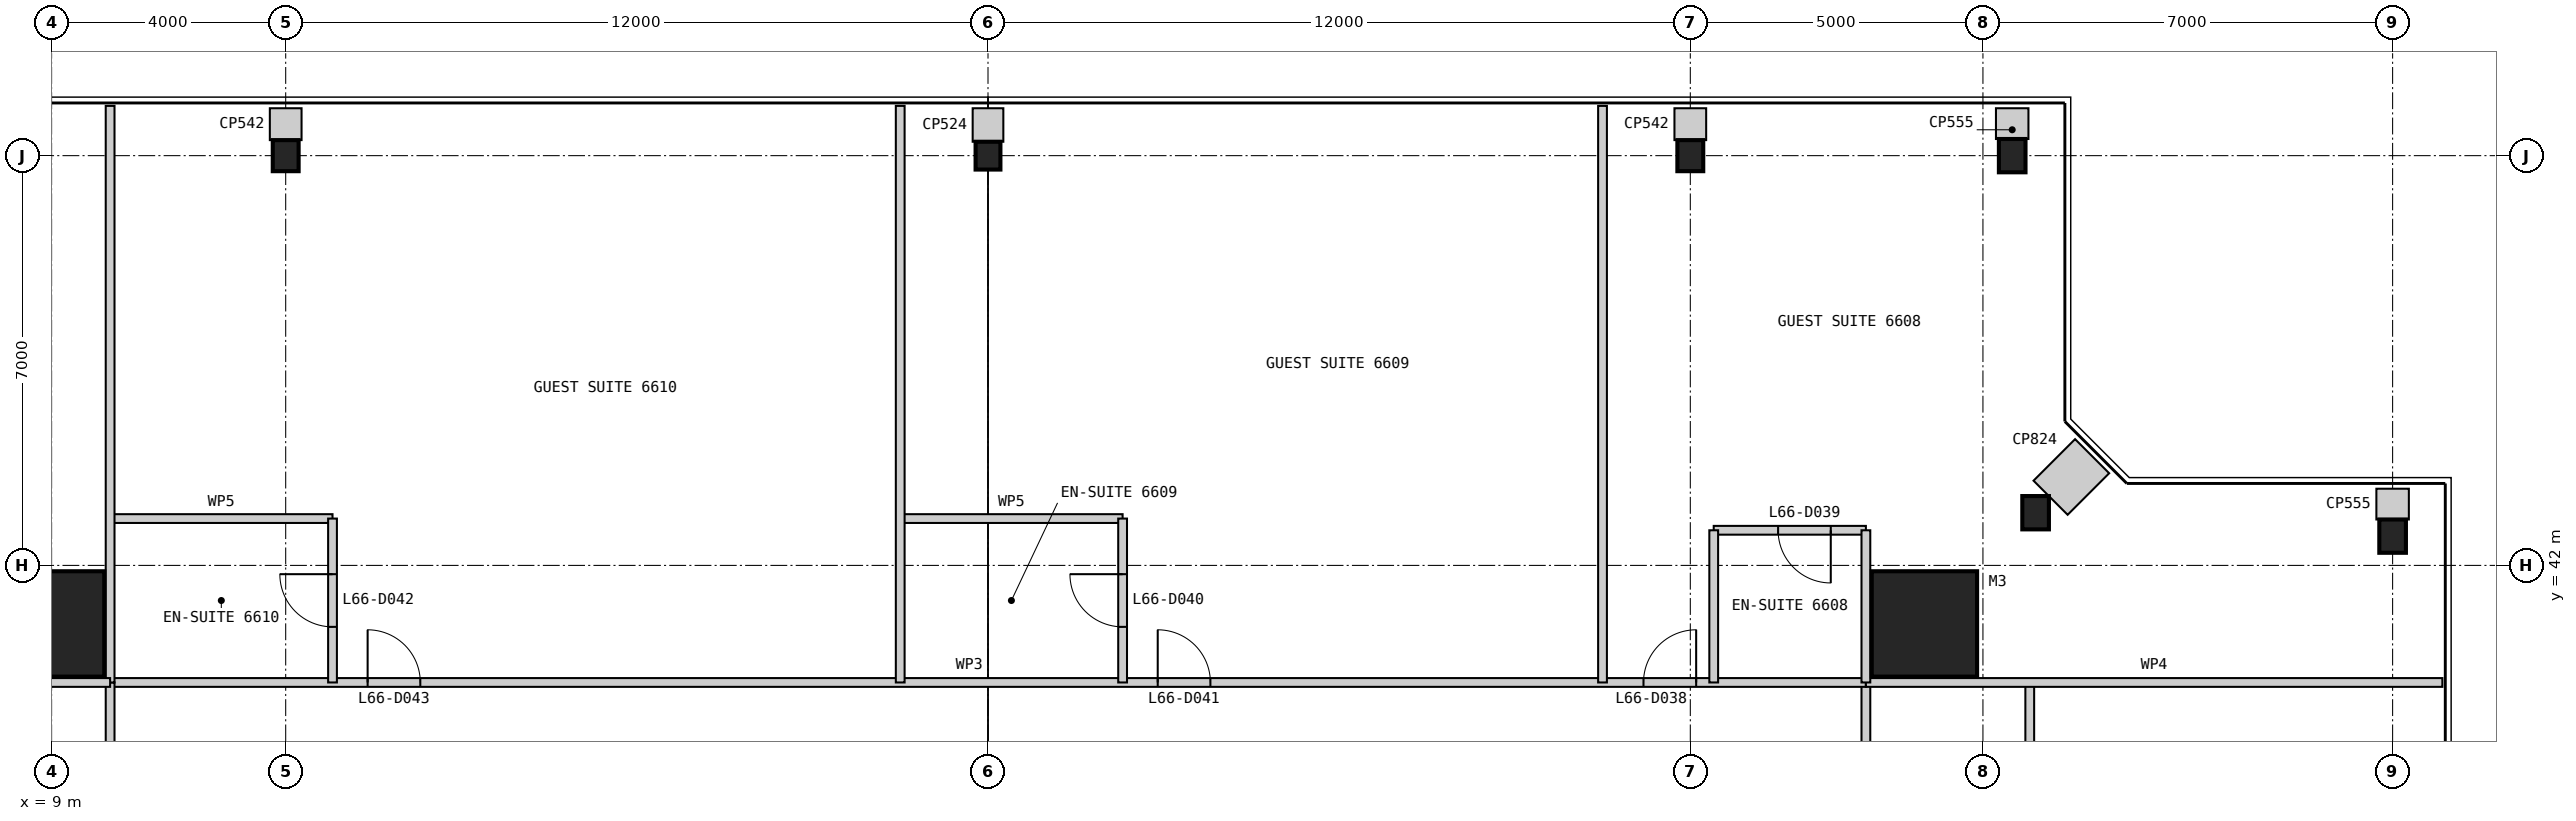
"""IFC4 building model, lengths in metres.
Left out: names, types, materials, properties, quantities, classifications, styles, units other than length and angle.
Written with IfcOpenShell. Run it as: python <this file> out.ifc"""

import sys

from ifc_helpers import new_model, si_unit, direction, frame, frame_2d, origin, origin_2d, place, context, subcontext, project, spatial, rectangle, i_section, extrude, element, fill, save


model = new_model("IFC4")
c1 = context("Model", 3, precision=1e-05, world=origin(), true_north=direction((0.0, 1.0)))
c2 = subcontext(c1, "Body", "Model", "MODEL_VIEW")
j1 = project(units=[si_unit("LENGTHUNIT", "METRE"), si_unit("PLANEANGLEUNIT", "RADIAN")], contexts=[c1])
p1 = place(None, origin())
s1 = spatial("IfcSite", under=j1, at=p1, CompositionType="ELEMENT")
p2 = place(p1, origin())
s2 = spatial("IfcBuilding", under=s1, at=p2, CompositionType="ELEMENT")
p3 = place(p2, frame((0.0, 0.0, 276.4)))
s3 = spatial("IfcBuildingStorey", under=s2, at=p3, CompositionType="ELEMENT", Elevation=276.4)
for number, where, z_axis, x_axis in (
    (1, (41.0, 41.0, 0.0), (0.0, 0.0, 1.0), (1.0, 0.0, 0.0)),
    (2, (9.0, 41.0, 0.0), (0.0, 0.0, 1.0), (1.0, 0.0, 0.0)),
):
    element("IfcColumn", number, at=place(p3, frame(where, z_axis=z_axis, x_axis=x_axis)), inside=s3, PredefinedType="COLUMN", context=c2, shape_type="SweptSolid", body=[
        extrude(rectangle(XDim=1.8, YDim=1.8, at=origin_2d()), origin(), (0.0, 0.0, 1.0), 3.4),
    ])
for number, where, z_axis, x_axis in (
    (3, (49.0, 42.5, 0.0), (0.0, 0.0, 1.0), (1.0, 0.0, 0.0)),
    (4, (42.9, 42.9, 0.0), (0.0, 0.0, 1.0), (1.0, 0.0, 0.0)),
    (5, (42.5, 49.0, 0.0), (0.0, 0.0, 1.0), (1.0, 0.0, 0.0)),
):
    element("IfcColumn", number, at=place(p3, frame(where, z_axis=z_axis, x_axis=x_axis)), inside=s3, PredefinedType="COLUMN", context=c2, shape_type="SweptSolid", body=[
        extrude(i_section(OverallWidth=0.455, OverallDepth=0.569, WebThickness=0.078, FlangeThickness=0.125, at=origin_2d()), origin(), (0.0, 0.0, 1.0), 3.4),
    ])
p4 = place(p3, frame((37.0, 49.0, 0.0), z_axis=(0.0, 0.0, 1.0), x_axis=(1.0, 0.0, 0.0)))
e6 = element("IfcColumn", 6, at=p4, inside=s3, PredefinedType="COLUMN", context=c2, shape_type="SweptSolid", body=[
    extrude(i_section(OverallWidth=0.442, OverallDepth=0.531, WebThickness=0.066, FlangeThickness=0.106, at=origin_2d()), origin(), (0.0, 0.0, 1.0), 3.4),
])
p5 = place(p3, frame((25.0, 49.0, 0.0), z_axis=(0.0, 0.0, 1.0), x_axis=(1.0, 0.0, 0.0)))
e7 = element("IfcColumn", 7, at=p5, inside=s3, PredefinedType="COLUMN", context=c2, shape_type="SweptSolid", body=[
    extrude(i_section(OverallWidth=0.424, OverallDepth=0.475, WebThickness=0.048, FlangeThickness=0.077, at=origin_2d()), origin(), (0.0, 0.0, 1.0), 3.4),
])
p6 = place(p3, frame((13.0, 49.0, 0.0), z_axis=(0.0, 0.0, 1.0), x_axis=(1.0, 0.0, 0.0)))
e8 = element("IfcColumn", 8, at=p6, inside=s3, PredefinedType="COLUMN", context=c2, shape_type="SweptSolid", body=[
    extrude(i_section(OverallWidth=0.442, OverallDepth=0.531, WebThickness=0.066, FlangeThickness=0.106, at=origin_2d()), origin(), (0.0, 0.0, 1.0), 3.4),
])
p7 = place(p3, frame((40.0, 10.0, 0.0), z_axis=(0.0, 0.0, 1.0), x_axis=(0.0, 1.0, 0.0)))
e9 = element("IfcWall", 9, at=p7, inside=s3, PredefinedType="PARTITIONING", context=c2, shape_type="SweptSolid", body=[
    extrude(rectangle(XDim=30.0, YDim=0.15, at=frame_2d((15.0, 0.0))), origin(), (0.0, 0.0, 1.0), 2.638),
])
p8 = place(p7, frame((2.9, 0.0, 0.0)))
e10 = element("IfcOpeningElement", 10, at=p8, cuts=e9, PredefinedType="OPENING", context=c2, shape_type="SweptSolid", body=[
    extrude(rectangle(XDim=0.9, YDim=2.1, at=frame_2d((0.45, 1.05))), frame((0.0, 0.085, 0.0), z_axis=(0.0, -1.0, 0.0), x_axis=(1.0, 0.0, 0.0)), (0.0, 0.0, 1.0), 0.17),
])
p9 = place(p7, frame((11.2, 0.0, 0.0)))
e11 = element("IfcOpeningElement", 11, at=p9, cuts=e9, PredefinedType="OPENING", context=c2, shape_type="SweptSolid", body=[
    extrude(rectangle(XDim=0.9, YDim=2.1, at=frame_2d((0.45, 1.05))), frame((0.0, 0.085, 0.0), z_axis=(0.0, -1.0, 0.0), x_axis=(1.0, 0.0, 0.0)), (0.0, 0.0, 1.0), 0.17),
])
p10 = place(p7, frame((24.7, 0.0, 0.0)))
e12 = element("IfcOpeningElement", 12, at=p10, cuts=e9, PredefinedType="OPENING", context=c2, shape_type="SweptSolid", body=[
    extrude(rectangle(XDim=0.9, YDim=2.1, at=frame_2d((0.45, 1.05))), frame((0.0, 0.085, 0.0), z_axis=(0.0, -1.0, 0.0), x_axis=(1.0, 0.0, 0.0)), (0.0, 0.0, 1.0), 0.17),
])
p11 = place(p3, frame((42.8, 36.2, 0.0), z_axis=(0.0, 0.0, 1.0), x_axis=(0.0, 1.0, 0.0)))
e13 = element("IfcWall", 13, at=p11, inside=s3, PredefinedType="PARTITIONING", context=c2, shape_type="SweptSolid", body=[
    extrude(rectangle(XDim=3.8, YDim=0.15, at=frame_2d((1.9, 0.0))), origin(), (0.0, 0.0, 1.0), 3.25),
])
p12 = place(p3, frame((40.0, 40.0, 0.0), z_axis=(0.0, 0.0, 1.0), x_axis=(-1.0, 0.0, 0.0)))
e14 = element("IfcWall", 14, at=p12, inside=s3, PredefinedType="PARTITIONING", context=c2, shape_type="SweptSolid", body=[
    extrude(rectangle(XDim=30.0, YDim=0.15, at=frame_2d((15.0, 0.0))), origin(), (0.0, 0.0, 1.0), 3.25),
])
p13 = place(p12, frame((2.9, 0.0, 0.0)))
e15 = element("IfcOpeningElement", 15, at=p13, cuts=e14, PredefinedType="OPENING", context=c2, shape_type="SweptSolid", body=[
    extrude(rectangle(XDim=0.9, YDim=2.1, at=frame_2d((0.45, 1.05))), frame((0.0, 0.085, 0.0), z_axis=(0.0, -1.0, 0.0), x_axis=(1.0, 0.0, 0.0)), (0.0, 0.0, 1.0), 0.17),
])
p14 = place(p12, frame((11.2, 0.0, 0.0)))
e16 = element("IfcOpeningElement", 16, at=p14, cuts=e14, PredefinedType="OPENING", context=c2, shape_type="SweptSolid", body=[
    extrude(rectangle(XDim=0.9, YDim=2.1, at=frame_2d((0.45, 1.05))), frame((0.0, 0.085, 0.0), z_axis=(0.0, -1.0, 0.0), x_axis=(1.0, 0.0, 0.0)), (0.0, 0.0, 1.0), 0.17),
])
p15 = place(p12, frame((24.7, 0.0, 0.0)))
e17 = element("IfcOpeningElement", 17, at=p15, cuts=e14, PredefinedType="OPENING", context=c2, shape_type="SweptSolid", body=[
    extrude(rectangle(XDim=0.9, YDim=2.1, at=frame_2d((0.45, 1.05))), frame((0.0, 0.085, 0.0), z_axis=(0.0, -1.0, 0.0), x_axis=(1.0, 0.0, 0.0)), (0.0, 0.0, 1.0), 0.17),
])
p16 = place(p3, frame((49.85, 40.0, 0.0), z_axis=(0.0, 0.0, 1.0), x_axis=(-1.0, 0.0, 0.0)))
e18 = element("IfcWall", 18, at=p16, inside=s3, PredefinedType="PARTITIONING", context=c2, shape_type="SweptSolid", body=[
    extrude(rectangle(XDim=9.85, YDim=0.15, at=frame_2d((4.925, 0.0))), origin(), (0.0, 0.0, 1.0), 3.25),
])
p17 = place(p3, frame((40.0, 42.6, 0.0), z_axis=(0.0, 0.0, 1.0), x_axis=(-1.0, 0.0, 0.0)))
e19 = element("IfcWall", 19, at=p17, inside=s3, PredefinedType="PARTITIONING", context=c2, shape_type="SweptSolid", body=[
    extrude(rectangle(XDim=2.6, YDim=0.15, at=frame_2d((1.3, 0.0))), origin(), (0.0, 0.0, 1.0), 3.25),
])
p18 = place(p17, frame((0.6, 0.0, 0.0)))
e20 = element("IfcOpeningElement", 20, at=p18, cuts=e19, PredefinedType="OPENING", context=c2, shape_type="SweptSolid", body=[
    extrude(rectangle(XDim=0.9, YDim=2.1, at=frame_2d((0.45, 1.05))), frame((0.0, 0.085, 0.0), z_axis=(0.0, -1.0, 0.0), x_axis=(1.0, 0.0, 0.0)), (0.0, 0.0, 1.0), 0.17),
])
for number, where, z_axis, x_axis in (
    (21, (40.0, 42.6, 0.0), (0.0, 0.0, 1.0), (0.0, -1.0, 0.0)),
    (22, (37.4, 42.6, 0.0), (0.0, 0.0, 1.0), (0.0, -1.0, 0.0)),
):
    element("IfcWall", number, at=place(p3, frame(where, z_axis=z_axis, x_axis=x_axis)), inside=s3, PredefinedType="PARTITIONING", context=c2, shape_type="SweptSolid", body=[
        extrude(rectangle(XDim=2.6, YDim=0.15, at=frame_2d((1.3, 0.0))), origin(), (0.0, 0.0, 1.0), 3.25),
    ])
p19 = place(p3, frame((35.5, 49.85, 0.0), z_axis=(0.0, 0.0, 1.0), x_axis=(0.0, -1.0, 0.0)))
e23 = element("IfcWall", 23, at=p19, inside=s3, PredefinedType="PARTITIONING", context=c2, shape_type="SweptSolid", body=[
    extrude(rectangle(XDim=9.85, YDim=0.15, at=frame_2d((4.925, 0.0))), origin(), (0.0, 0.0, 1.0), 3.25),
])
p20 = place(p3, frame((27.3, 42.8, 0.0), z_axis=(0.0, 0.0, 1.0), x_axis=(-1.0, 0.0, 0.0)))
e24 = element("IfcWall", 24, at=p20, inside=s3, PredefinedType="PARTITIONING", context=c2, shape_type="SweptSolid", body=[
    extrude(rectangle(XDim=3.8, YDim=0.15, at=frame_2d((1.9, 0.0))), origin(), (0.0, 0.0, 1.0), 3.25),
])
p21 = place(p3, frame((27.3, 42.8, 0.0), z_axis=(0.0, 0.0, 1.0), x_axis=(0.0, -1.0, 0.0)))
e25 = element("IfcWall", 25, at=p21, inside=s3, PredefinedType="PARTITIONING", context=c2, shape_type="SweptSolid", body=[
    extrude(rectangle(XDim=2.8, YDim=0.15, at=frame_2d((1.4, 0.0))), origin(), (0.0, 0.0, 1.0), 3.25),
])
p22 = place(p21, frame((0.95, 0.0, 0.0)))
e26 = element("IfcOpeningElement", 26, at=p22, cuts=e25, PredefinedType="OPENING", context=c2, shape_type="SweptSolid", body=[
    extrude(rectangle(XDim=0.9, YDim=2.1, at=frame_2d((0.45, 1.05))), frame((0.0, 0.085, 0.0), z_axis=(0.0, -1.0, 0.0), x_axis=(1.0, 0.0, 0.0)), (0.0, 0.0, 1.0), 0.17),
])
p23 = place(p3, frame((23.5, 49.85, 0.0), z_axis=(0.0, 0.0, 1.0), x_axis=(0.0, -1.0, 0.0)))
e27 = element("IfcWall", 27, at=p23, inside=s3, PredefinedType="PARTITIONING", context=c2, shape_type="SweptSolid", body=[
    extrude(rectangle(XDim=9.85, YDim=0.15, at=frame_2d((4.925, 0.0))), origin(), (0.0, 0.0, 1.0), 3.25),
])
p24 = place(p3, frame((13.8, 42.8, 0.0), z_axis=(0.0, 0.0, 1.0), x_axis=(-1.0, 0.0, 0.0)))
e28 = element("IfcWall", 28, at=p24, inside=s3, PredefinedType="PARTITIONING", context=c2, shape_type="SweptSolid", body=[
    extrude(rectangle(XDim=3.8, YDim=0.15, at=frame_2d((1.9, 0.0))), origin(), (0.0, 0.0, 1.0), 3.25),
])
p25 = place(p3, frame((13.8, 42.8, 0.0), z_axis=(0.0, 0.0, 1.0), x_axis=(0.0, -1.0, 0.0)))
e29 = element("IfcWall", 29, at=p25, inside=s3, PredefinedType="PARTITIONING", context=c2, shape_type="SweptSolid", body=[
    extrude(rectangle(XDim=2.8, YDim=0.15, at=frame_2d((1.4, 0.0))), origin(), (0.0, 0.0, 1.0), 3.25),
])
p26 = place(p25, frame((0.95, 0.0, 0.0)))
e30 = element("IfcOpeningElement", 30, at=p26, cuts=e29, PredefinedType="OPENING", context=c2, shape_type="SweptSolid", body=[
    extrude(rectangle(XDim=0.9, YDim=2.1, at=frame_2d((0.45, 1.05))), frame((0.0, 0.085, 0.0), z_axis=(0.0, -1.0, 0.0), x_axis=(1.0, 0.0, 0.0)), (0.0, 0.0, 1.0), 0.17),
])
p27 = place(p3, frame((10.0, 40.0, 0.0), z_axis=(0.0, 0.0, 1.0), x_axis=(0.0, -1.0, 0.0)))
e31 = element("IfcWall", 31, at=p27, inside=s3, PredefinedType="PARTITIONING", context=c2, shape_type="SweptSolid", body=[
    extrude(rectangle(XDim=30.0, YDim=0.15, at=frame_2d((15.0, 0.0))), origin(), (0.0, 0.0, 1.0), 2.638),
])
p28 = place(p27, frame((2.9, 0.0, 0.0)))
e32 = element("IfcOpeningElement", 32, at=p28, cuts=e31, PredefinedType="OPENING", context=c2, shape_type="SweptSolid", body=[
    extrude(rectangle(XDim=0.9, YDim=2.1, at=frame_2d((0.45, 1.05))), frame((0.0, 0.085, 0.0), z_axis=(0.0, -1.0, 0.0), x_axis=(1.0, 0.0, 0.0)), (0.0, 0.0, 1.0), 0.17),
])
p29 = place(p27, frame((11.2, 0.0, 0.0)))
e33 = element("IfcOpeningElement", 33, at=p29, cuts=e31, PredefinedType="OPENING", context=c2, shape_type="SweptSolid", body=[
    extrude(rectangle(XDim=0.9, YDim=2.1, at=frame_2d((0.45, 1.05))), frame((0.0, 0.085, 0.0), z_axis=(0.0, -1.0, 0.0), x_axis=(1.0, 0.0, 0.0)), (0.0, 0.0, 1.0), 0.17),
])
p30 = place(p27, frame((24.7, 0.0, 0.0)))
e34 = element("IfcOpeningElement", 34, at=p30, cuts=e31, PredefinedType="OPENING", context=c2, shape_type="SweptSolid", body=[
    extrude(rectangle(XDim=0.9, YDim=2.1, at=frame_2d((0.45, 1.05))), frame((0.0, 0.085, 0.0), z_axis=(0.0, -1.0, 0.0), x_axis=(1.0, 0.0, 0.0)), (0.0, 0.0, 1.0), 0.17),
])
p31 = place(p3, frame((10.0, 49.85, 0.0), z_axis=(0.0, 0.0, 1.0), x_axis=(0.0, -1.0, 0.0)))
e35 = element("IfcWall", 35, at=p31, inside=s3, PredefinedType="PARTITIONING", context=c2, shape_type="SweptSolid", body=[
    extrude(rectangle(XDim=9.85, YDim=0.15, at=frame_2d((4.925, 0.0))), origin(), (0.0, 0.0, 1.0), 3.25),
])
p32 = place(p3, frame((7.4, 40.0, 0.0), z_axis=(0.0, 0.0, 1.0), x_axis=(1.0, 0.0, 0.0)))
e36 = element("IfcWall", 36, at=p32, inside=s3, PredefinedType="PARTITIONING", context=c2, shape_type="SweptSolid", body=[
    extrude(rectangle(XDim=2.6, YDim=0.15, at=frame_2d((1.3, 0.0))), origin(), (0.0, 0.0, 1.0), 3.25),
])
p33 = place(p3, frame((49.0, 43.31, 0.0), z_axis=(0.0, 0.0, 1.0), x_axis=(0.0, -1.0, 0.0)))
e37 = element("IfcWall", 37, at=p33, inside=s3, PredefinedType="PARTITIONING", context=c2, shape_type="SweptSolid", body=[
    extrude(rectangle(XDim=0.526, YDim=0.555, at=frame_2d((0.263, 0.0))), origin(), (0.0, 0.0, 1.0), 3.25),
])
p34 = place(p3, frame((43.866, 43.866, 0.0), z_axis=(0.0, 0.0, 1.0), x_axis=(-0.707106781187, -0.707106781187, 0.0)))
e38 = element("IfcWall", 38, at=p34, inside=s3, PredefinedType="PARTITIONING", context=c2, shape_type="SweptSolid", body=[
    extrude(rectangle(XDim=1.004, YDim=0.824, at=frame_2d((0.502, 0.0))), origin(), (0.0, 0.0, 1.0), 3.25),
])
p35 = place(p3, frame((42.5, 49.81, 0.0), z_axis=(0.0, 0.0, 1.0), x_axis=(0.0, -1.0, 0.0)))
e39 = element("IfcWall", 39, at=p35, inside=s3, PredefinedType="PARTITIONING", context=c2, shape_type="SweptSolid", body=[
    extrude(rectangle(XDim=0.526, YDim=0.555, at=frame_2d((0.263, 0.0))), origin(), (0.0, 0.0, 1.0), 3.25),
])
p36 = place(p3, frame((37.0, 49.81, 0.0), z_axis=(0.0, 0.0, 1.0), x_axis=(0.0, -1.0, 0.0)))
e40 = element("IfcWall", 40, at=p36, inside=s3, PredefinedType="PARTITIONING", context=c2, shape_type="SweptSolid", body=[
    extrude(rectangle(XDim=0.545, YDim=0.542, at=frame_2d((0.272, 0.0))), origin(), (0.0, 0.0, 1.0), 3.25),
])
p37 = place(p3, frame((25.0, 49.81, 0.0), z_axis=(0.0, 0.0, 1.0), x_axis=(0.0, -1.0, 0.0)))
e41 = element("IfcWall", 41, at=p37, inside=s3, PredefinedType="PARTITIONING", context=c2, shape_type="SweptSolid", body=[
    extrude(rectangle(XDim=0.573, YDim=0.524, at=frame_2d((0.286, 0.0))), origin(), (0.0, 0.0, 1.0), 3.25),
])
p38 = place(p3, frame((13.0, 49.81, 0.0), z_axis=(0.0, 0.0, 1.0), x_axis=(0.0, -1.0, 0.0)))
e42 = element("IfcWall", 42, at=p38, inside=s3, PredefinedType="PARTITIONING", context=c2, shape_type="SweptSolid", body=[
    extrude(rectangle(XDim=0.545, YDim=0.542, at=frame_2d((0.272, 0.0))), origin(), (0.0, 0.0, 1.0), 3.25),
])
p39 = place(p13, frame((0.9, 0.0, 0.0), z_axis=(0.0, 0.0, 1.0), x_axis=(-1.0, 0.0, 0.0)))
e43 = element("IfcDoor", 43, at=p39, inside=s3, OperationType="SINGLE_SWING_RIGHT", PredefinedType="DOOR", context=c2, shape_type="SweptSolid", body=[
    extrude(rectangle(XDim=0.9, YDim=2.1, at=frame_2d((0.45, 1.05))), frame((0.0, 0.025, 0.0), z_axis=(0.0, -1.0, 0.0), x_axis=(1.0, 0.0, 0.0)), (0.0, 0.0, 1.0), 0.05),
])
fill(e15, e43)
p40 = place(p18, origin())
e44 = element("IfcDoor", 44, at=p40, inside=s3, OperationType="SINGLE_SWING_LEFT", PredefinedType="DOOR", context=c2, shape_type="SweptSolid", body=[
    extrude(rectangle(XDim=0.9, YDim=2.1, at=frame_2d((0.45, 1.05))), frame((0.0, 0.025, 0.0), z_axis=(0.0, -1.0, 0.0), x_axis=(1.0, 0.0, 0.0)), (0.0, 0.0, 1.0), 0.05),
])
fill(e20, e44)
p41 = place(p22, frame((0.9, 0.0, 0.0), z_axis=(0.0, 0.0, 1.0), x_axis=(-1.0, 0.0, 0.0)))
e45 = element("IfcDoor", 45, at=p41, inside=s3, OperationType="SINGLE_SWING_RIGHT", PredefinedType="DOOR", context=c2, shape_type="SweptSolid", body=[
    extrude(rectangle(XDim=0.9, YDim=2.1, at=frame_2d((0.45, 1.05))), frame((0.0, 0.025, 0.0), z_axis=(0.0, -1.0, 0.0), x_axis=(1.0, 0.0, 0.0)), (0.0, 0.0, 1.0), 0.05),
])
fill(e26, e45)
p42 = place(p14, frame((0.9, 0.0, 0.0), z_axis=(0.0, 0.0, 1.0), x_axis=(-1.0, 0.0, 0.0)))
e46 = element("IfcDoor", 46, at=p42, inside=s3, OperationType="SINGLE_SWING_LEFT", PredefinedType="DOOR", context=c2, shape_type="SweptSolid", body=[
    extrude(rectangle(XDim=0.9, YDim=2.1, at=frame_2d((0.45, 1.05))), frame((0.0, 0.025, 0.0), z_axis=(0.0, -1.0, 0.0), x_axis=(1.0, 0.0, 0.0)), (0.0, 0.0, 1.0), 0.05),
])
fill(e16, e46)
p43 = place(p26, frame((0.9, 0.0, 0.0), z_axis=(0.0, 0.0, 1.0), x_axis=(-1.0, 0.0, 0.0)))
e47 = element("IfcDoor", 47, at=p43, inside=s3, OperationType="SINGLE_SWING_RIGHT", PredefinedType="DOOR", context=c2, shape_type="SweptSolid", body=[
    extrude(rectangle(XDim=0.9, YDim=2.1, at=frame_2d((0.45, 1.05))), frame((0.0, 0.025, 0.0), z_axis=(0.0, -1.0, 0.0), x_axis=(1.0, 0.0, 0.0)), (0.0, 0.0, 1.0), 0.05),
])
fill(e30, e47)
p44 = place(p15, frame((0.9, 0.0, 0.0), z_axis=(0.0, 0.0, 1.0), x_axis=(-1.0, 0.0, 0.0)))
e48 = element("IfcDoor", 48, at=p44, inside=s3, OperationType="SINGLE_SWING_LEFT", PredefinedType="DOOR", context=c2, shape_type="SweptSolid", body=[
    extrude(rectangle(XDim=0.9, YDim=2.1, at=frame_2d((0.45, 1.05))), frame((0.0, 0.025, 0.0), z_axis=(0.0, -1.0, 0.0), x_axis=(1.0, 0.0, 0.0)), (0.0, 0.0, 1.0), 0.05),
])
fill(e17, e48)
save(model, sys.argv[1])
